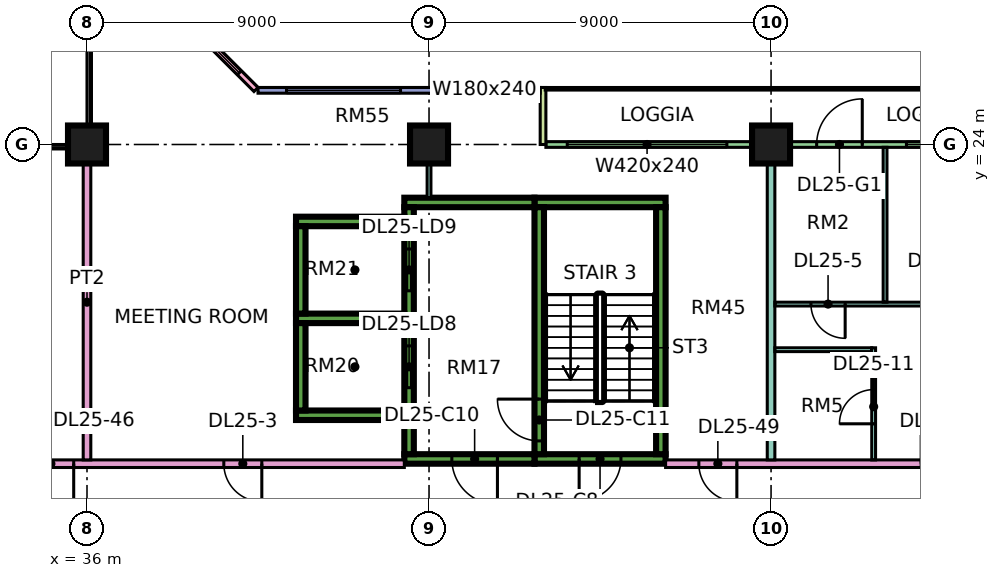
"""IFC4 building model, lengths in metres.
Left out: names, types, materials, properties, quantities, classifications, styles, units other than length and angle.
Written with IfcOpenShell. Run it as: python <this file> out.ifc"""

import sys

from ifc_helpers import new_model, si_unit, direction, frame, frame_2d, origin, origin_2d, place, context, subcontext, project, spatial, rectangle, extrude, element, fill, save


model = new_model("IFC4")
c1 = context("Model", 3, precision=1e-05, world=origin(), true_north=direction((0.0, 1.0)))
c2 = subcontext(c1, "Body", "Model", "MODEL_VIEW")
j1 = project(units=[si_unit("LENGTHUNIT", "METRE"), si_unit("PLANEANGLEUNIT", "RADIAN")], contexts=[c1])
p1 = place(None, origin())
s1 = spatial("IfcSite", under=j1, at=p1, CompositionType="ELEMENT")
p2 = place(p1, origin())
s2 = spatial("IfcBuilding", under=s1, at=p2, CompositionType="ELEMENT")
p3 = place(p2, frame((0.0, 0.0, 110.65)))
s3 = spatial("IfcBuildingStorey", under=s2, at=p3, CompositionType="ELEMENT", Elevation=110.65)
for number, where, z_axis, x_axis in (
    (1, (36.0, 24.0, 0.0), (0.0, 0.0, 1.0), (1.0, 0.0, 0.0)),
    (2, (45.0, 24.0, 0.0), (0.0, 0.0, 1.0), (1.0, 0.0, 0.0)),
    (3, (54.0, 24.0, 0.0), (0.0, 0.0, 1.0), (1.0, 0.0, 0.0)),
):
    element("IfcColumn", number, at=place(p3, frame(where, z_axis=z_axis, x_axis=x_axis)), inside=s3, PredefinedType="COLUMN", context=c2, shape_type="SweptSolid", body=[
        extrude(rectangle(XDim=1.0, YDim=1.0, at=origin_2d()), origin(), (0.0, 0.0, 1.0), 3.75),
    ])
p4 = place(p3, frame((47.775, 15.725, 0.0), z_axis=(0.0, 0.0, 1.0), x_axis=(1.0, 0.0, 0.0)))
e4 = element("IfcWall", 4, at=p4, inside=s3, PredefinedType="SHEAR", context=c2, shape_type="SweptSolid", body=[
    extrude(rectangle(XDim=3.45, YDim=0.25, at=frame_2d((1.725, 0.0))), origin(), (0.0, 0.0, 1.0), 3.75),
])
p5 = place(p4, frame((1.175, 0.0, 0.0)))
e5 = element("IfcOpeningElement", 5, at=p5, cuts=e4, PredefinedType="OPENING", context=c2, shape_type="SweptSolid", body=[
    extrude(rectangle(XDim=1.1, YDim=2.2, at=frame_2d((0.55, 1.1))), frame((0.0, 0.135, 0.0), z_axis=(0.0, -1.0, 0.0), x_axis=(1.0, 0.0, 0.0)), (0.0, 0.0, 1.0), 0.27),
])
p6 = place(p3, frame((47.775, 22.475, 0.0), z_axis=(0.0, 0.0, 1.0), x_axis=(1.0, 0.0, 0.0)))
e6 = element("IfcWall", 6, at=p6, inside=s3, PredefinedType="SHEAR", context=c2, shape_type="SweptSolid", body=[
    extrude(rectangle(XDim=3.45, YDim=0.25, at=frame_2d((1.725, 0.0))), origin(), (0.0, 0.0, 1.0), 3.75),
])
p7 = place(p3, frame((47.9, 15.85, 0.0), z_axis=(0.0, 0.0, 1.0), x_axis=(0.0, 1.0, 0.0)))
e7 = element("IfcWall", 7, at=p7, inside=s3, PredefinedType="SHEAR", context=c2, shape_type="SweptSolid", body=[
    extrude(rectangle(XDim=6.5, YDim=0.25, at=frame_2d((3.25, 0.0))), origin(), (0.0, 0.0, 1.0), 3.75),
])
p8 = place(p7, frame((0.35, 0.0, 0.0)))
e8 = element("IfcOpeningElement", 8, at=p8, cuts=e7, PredefinedType="OPENING", context=c2, shape_type="SweptSolid", body=[
    extrude(rectangle(XDim=1.1, YDim=2.2, at=frame_2d((0.55, 1.1))), frame((0.0, 0.135, 0.0), z_axis=(0.0, -1.0, 0.0), x_axis=(1.0, 0.0, 0.0)), (0.0, 0.0, 1.0), 0.27),
])
p9 = place(p3, frame((51.1, 15.85, 0.0), z_axis=(0.0, 0.0, 1.0), x_axis=(0.0, 1.0, 0.0)))
e9 = element("IfcWall", 9, at=p9, inside=s3, PredefinedType="SHEAR", context=c2, shape_type="SweptSolid", body=[
    extrude(rectangle(XDim=6.5, YDim=0.25, at=frame_2d((3.25, 0.0))), origin(), (0.0, 0.0, 1.0), 3.75),
])
p10 = place(p3, frame((44.35, 15.725, 0.0), z_axis=(0.0, 0.0, 1.0), x_axis=(1.0, 0.0, 0.0)))
e10 = element("IfcWall", 10, at=p10, inside=s3, PredefinedType="SHEAR", context=c2, shape_type="SweptSolid", body=[
    extrude(rectangle(XDim=3.425, YDim=0.25, at=frame_2d((1.712, 0.0))), origin(), (0.0, 0.0, 1.0), 3.75),
])
p11 = place(p10, frame((1.25, 0.0, 0.0)))
e11 = element("IfcOpeningElement", 11, at=p11, cuts=e10, PredefinedType="OPENING", context=c2, shape_type="SweptSolid", body=[
    extrude(rectangle(XDim=1.2, YDim=2.2, at=frame_2d((0.6, 1.1))), frame((0.0, 0.135, 0.0), z_axis=(0.0, -1.0, 0.0), x_axis=(1.0, 0.0, 0.0)), (0.0, 0.0, 1.0), 0.27),
])
p12 = place(p3, frame((44.35, 22.475, 0.0), z_axis=(0.0, 0.0, 1.0), x_axis=(1.0, 0.0, 0.0)))
e12 = element("IfcWall", 12, at=p12, inside=s3, PredefinedType="SHEAR", context=c2, shape_type="SweptSolid", body=[
    extrude(rectangle(XDim=3.425, YDim=0.25, at=frame_2d((1.712, 0.0))), origin(), (0.0, 0.0, 1.0), 3.75),
])
p13 = place(p3, frame((44.475, 15.85, 0.0), z_axis=(0.0, 0.0, 1.0), x_axis=(0.0, 1.0, 0.0)))
e13 = element("IfcWall", 13, at=p13, inside=s3, PredefinedType="SHEAR", context=c2, shape_type="SweptSolid", body=[
    extrude(rectangle(XDim=6.5, YDim=0.25, at=frame_2d((3.25, 0.0))), origin(), (0.0, 0.0, 1.0), 3.75),
])
p14 = place(p13, frame((1.75, 0.0, 0.0)))
e14 = element("IfcOpeningElement", 14, at=p14, cuts=e13, PredefinedType="OPENING", context=c2, shape_type="SweptSolid", body=[
    extrude(rectangle(XDim=1.1, YDim=2.2, at=frame_2d((0.55, 1.1))), frame((0.0, 0.135, 0.0), z_axis=(0.0, -1.0, 0.0), x_axis=(1.0, 0.0, 0.0)), (0.0, 0.0, 1.0), 0.27),
])
p15 = place(p13, frame((4.3, 0.0, 0.0)))
e15 = element("IfcOpeningElement", 15, at=p15, cuts=e13, PredefinedType="OPENING", context=c2, shape_type="SweptSolid", body=[
    extrude(rectangle(XDim=1.1, YDim=2.2, at=frame_2d((0.55, 1.1))), frame((0.0, 0.135, 0.0), z_axis=(0.0, -1.0, 0.0), x_axis=(1.0, 0.0, 0.0)), (0.0, 0.0, 1.0), 0.27),
])
for number, where, z_axis, x_axis in (
    (16, (41.5, 16.875, 0.0), (0.0, 0.0, 1.0), (1.0, 0.0, 0.0)),
    (17, (41.5, 19.425, 0.0), (0.0, 0.0, 1.0), (1.0, 0.0, 0.0)),
    (18, (41.5, 21.975, 0.0), (0.0, 0.0, 1.0), (1.0, 0.0, 0.0)),
):
    element("IfcWall", number, at=place(p3, frame(where, z_axis=z_axis, x_axis=x_axis)), inside=s3, PredefinedType="SHEAR", context=c2, shape_type="SweptSolid", body=[
        extrude(rectangle(XDim=2.85, YDim=0.25, at=frame_2d((1.425, 0.0))), origin(), (0.0, 0.0, 1.0), 3.75),
    ])
for number, where, z_axis, x_axis in (
    (19, (41.625, 17.0, 0.0), (0.0, 0.0, 1.0), (0.0, 1.0, 0.0)),
    (20, (41.625, 19.55, 0.0), (0.0, 0.0, 1.0), (0.0, 1.0, 0.0)),
):
    element("IfcWall", number, at=place(p3, frame(where, z_axis=z_axis, x_axis=x_axis)), inside=s3, PredefinedType="SHEAR", context=c2, shape_type="SweptSolid", body=[
        extrude(rectangle(XDim=2.3, YDim=0.25, at=frame_2d((1.15, 0.0))), origin(), (0.0, 0.0, 1.0), 3.75),
    ])
p16 = place(p3, frame((59.925, 24.0, 0.0), z_axis=(0.0, 0.0, 1.0), x_axis=(-1.0, 0.0, 0.0)))
e21 = element("IfcWall", 21, at=p16, inside=s3, PredefinedType="SOLIDWALL", context=c2, shape_type="SweptSolid", body=[
    extrude(rectangle(XDim=11.85, YDim=0.15, at=frame_2d((5.925, 0.0))), origin(), (0.0, 0.0, 1.0), 3.35),
])
p17 = place(p16, frame((0.562, 0.0, 0.45)))
e22 = element("IfcOpeningElement", 22, at=p17, cuts=e21, PredefinedType="OPENING", context=c2, shape_type="SweptSolid", body=[
    extrude(rectangle(XDim=1.8, YDim=2.4, at=frame_2d((0.9, 1.2))), frame((0.0, 0.085, 0.0), z_axis=(0.0, -1.0, 0.0), x_axis=(1.0, 0.0, 0.0)), (0.0, 0.0, 1.0), 0.17),
])
p18 = place(p16, frame((3.525, 0.0, 0.0)))
e23 = element("IfcOpeningElement", 23, at=p18, cuts=e21, PredefinedType="OPENING", context=c2, shape_type="SweptSolid", body=[
    extrude(rectangle(XDim=1.2, YDim=2.4, at=frame_2d((0.6, 1.2))), frame((0.0, 0.085, 0.0), z_axis=(0.0, -1.0, 0.0), x_axis=(1.0, 0.0, 0.0)), (0.0, 0.0, 1.0), 0.17),
])
p19 = place(p16, frame((7.087, 0.0, 0.45)))
e24 = element("IfcOpeningElement", 24, at=p19, cuts=e21, PredefinedType="OPENING", context=c2, shape_type="SweptSolid", body=[
    extrude(rectangle(XDim=4.2, YDim=2.4, at=frame_2d((2.1, 1.2))), frame((0.0, 0.085, 0.0), z_axis=(0.0, -1.0, 0.0), x_axis=(1.0, 0.0, 0.0)), (0.0, 0.0, 1.0), 0.17),
])
p20 = place(p3, frame((48.0, 25.5, 0.0), z_axis=(0.0, 0.0, 1.0), x_axis=(0.0, -1.0, 0.0)))
e25 = element("IfcWall", 25, at=p20, inside=s3, PredefinedType="SOLIDWALL", context=c2, shape_type="SweptSolid", body=[
    extrude(rectangle(XDim=1.5, YDim=0.15, at=frame_2d((0.75, 0.0))), origin(), (0.0, 0.0, 1.0), 3.35),
])
p21 = place(p3, frame((47.925, 25.425, 0.0), z_axis=(0.0, 0.0, 1.0), x_axis=(-1.0, 0.0, 0.0)))
e26 = element("IfcWall", 26, at=p21, inside=s3, PredefinedType="SOLIDWALL", context=c2, shape_type="SweptSolid", body=[
    extrude(rectangle(XDim=7.425, YDim=0.15, at=frame_2d((3.712, 0.0))), origin(), (0.0, 0.0, 1.0), 3.35),
])
p22 = place(p21, frame((0.562, 0.0, 0.45)))
e27 = element("IfcOpeningElement", 27, at=p22, cuts=e26, PredefinedType="OPENING", context=c2, shape_type="SweptSolid", body=[
    extrude(rectangle(XDim=1.8, YDim=2.4, at=frame_2d((0.9, 1.2))), frame((0.0, 0.085, 0.0), z_axis=(0.0, -1.0, 0.0), x_axis=(1.0, 0.0, 0.0)), (0.0, 0.0, 1.0), 0.17),
])
p23 = place(p21, frame((3.675, 0.0, 0.45)))
e28 = element("IfcOpeningElement", 28, at=p23, cuts=e26, PredefinedType="OPENING", context=c2, shape_type="SweptSolid", body=[
    extrude(rectangle(XDim=3.0, YDim=2.4, at=frame_2d((1.5, 1.2))), frame((0.0, 0.085, 0.0), z_axis=(0.0, -1.0, 0.0), x_axis=(1.0, 0.0, 0.0)), (0.0, 0.0, 1.0), 0.17),
])
p24 = place(p3, frame((40.447, 25.447, 0.0), z_axis=(0.0, 0.0, 1.0), x_axis=(-0.707106781187, 0.707106781187, 0.0)))
e29 = element("IfcWall", 29, at=p24, inside=s3, PredefinedType="SOLIDWALL", context=c2, shape_type="SweptSolid", body=[
    extrude(rectangle(XDim=4.243, YDim=0.15, at=frame_2d((2.121, 0.0))), origin(), (0.0, 0.0, 1.0), 3.35),
])
p25 = place(p24, frame((0.621, 0.0, 0.45)))
e30 = element("IfcOpeningElement", 30, at=p25, cuts=e29, PredefinedType="OPENING", context=c2, shape_type="SweptSolid", body=[
    extrude(rectangle(XDim=3.0, YDim=2.4, at=frame_2d((1.5, 1.2))), frame((0.0, 0.085, 0.0), z_axis=(0.0, -1.0, 0.0), x_axis=(1.0, 0.0, 0.0)), (0.0, 0.0, 1.0), 0.17),
])
p26 = place(p3, frame((34.0, 15.6, 0.0), z_axis=(0.0, 0.0, 1.0), x_axis=(1.0, 0.0, 0.0)))
e31 = element("IfcWall", 31, at=p26, inside=s3, PredefinedType="PARTITIONING", context=c2, shape_type="SweptSolid", body=[
    extrude(rectangle(XDim=10.35, YDim=0.2, at=frame_2d((5.175, 0.0))), origin(), (0.0, 0.0, 1.0), 3.35),
])
p27 = place(p26, frame((5.6, 0.0, 0.0)))
e32 = element("IfcOpeningElement", 32, at=p27, cuts=e31, PredefinedType="OPENING", context=c2, shape_type="SweptSolid", body=[
    extrude(rectangle(XDim=1.0, YDim=2.1, at=frame_2d((0.5, 1.05))), frame((0.0, 0.11, 0.0), z_axis=(0.0, -1.0, 0.0), x_axis=(1.0, 0.0, 0.0)), (0.0, 0.0, 1.0), 0.22),
])
p28 = place(p26, frame((0.45, 0.0, 0.0)))
e33 = element("IfcOpeningElement", 33, at=p28, cuts=e31, PredefinedType="OPENING", context=c2, shape_type="SweptSolid", body=[
    extrude(rectangle(XDim=1.2, YDim=2.1, at=frame_2d((0.6, 1.05))), frame((0.0, 0.11, 0.0), z_axis=(0.0, -1.0, 0.0), x_axis=(1.0, 0.0, 0.0)), (0.0, 0.0, 1.0), 0.22),
])
p29 = place(p3, frame((36.0, 15.7, 0.0), z_axis=(0.0, 0.0, 1.0), x_axis=(0.0, 1.0, 0.0)))
e34 = element("IfcWall", 34, at=p29, inside=s3, PredefinedType="PARTITIONING", context=c2, shape_type="SweptSolid", body=[
    extrude(rectangle(XDim=8.3, YDim=0.2, at=frame_2d((4.15, 0.0))), origin(), (0.0, 0.0, 1.0), 3.35),
])
p30 = place(p3, frame((45.0, 22.6, 0.0), z_axis=(0.0, 0.0, 1.0), x_axis=(0.0, 1.0, 0.0)))
e35 = element("IfcWall", 35, at=p30, inside=s3, PredefinedType="PARTITIONING", context=c2, shape_type="SweptSolid", body=[
    extrude(rectangle(XDim=1.4, YDim=0.1, at=frame_2d((0.7, 0.0))), origin(), (0.0, 0.0, 1.0), 3.35),
])
p31 = place(p3, frame((51.225, 15.6, 0.0), z_axis=(0.0, 0.0, 1.0), x_axis=(1.0, 0.0, 0.0)))
e36 = element("IfcWall", 36, at=p31, inside=s3, PredefinedType="PARTITIONING", context=c2, shape_type="SweptSolid", body=[
    extrude(rectangle(XDim=22.125, YDim=0.2, at=frame_2d((11.062, 0.0))), origin(), (0.0, 0.0, 1.0), 3.35),
])
p32 = place(p31, frame((6.725, 0.0, 0.0)))
e37 = element("IfcOpeningElement", 37, at=p32, cuts=e36, PredefinedType="OPENING", context=c2, shape_type="SweptSolid", body=[
    extrude(rectangle(XDim=1.0, YDim=2.1, at=frame_2d((0.5, 1.05))), frame((0.0, 0.11, 0.0), z_axis=(0.0, -1.0, 0.0), x_axis=(1.0, 0.0, 0.0)), (0.0, 0.0, 1.0), 0.22),
])
p33 = place(p31, frame((0.875, 0.0, 0.0)))
e38 = element("IfcOpeningElement", 38, at=p33, cuts=e36, PredefinedType="OPENING", context=c2, shape_type="SweptSolid", body=[
    extrude(rectangle(XDim=1.0, YDim=2.1, at=frame_2d((0.5, 1.05))), frame((0.0, 0.11, 0.0), z_axis=(0.0, -1.0, 0.0), x_axis=(1.0, 0.0, 0.0)), (0.0, 0.0, 1.0), 0.22),
])
p34 = place(p3, frame((54.0, 15.7, 0.0), z_axis=(0.0, 0.0, 1.0), x_axis=(0.0, 1.0, 0.0)))
e39 = element("IfcWall", 39, at=p34, inside=s3, PredefinedType="PARTITIONING", context=c2, shape_type="SweptSolid", body=[
    extrude(rectangle(XDim=8.226, YDim=0.2, at=frame_2d((4.113, 0.0))), origin(), (0.0, 0.0, 1.0), 3.35),
])
p35 = place(p3, frame((54.1, 18.6, 0.0), z_axis=(0.0, 0.0, 1.0), x_axis=(1.0, 0.0, 0.0)))
e40 = element("IfcWall", 40, at=p35, inside=s3, PredefinedType="PARTITIONING", context=c2, shape_type="SweptSolid", body=[
    extrude(rectangle(XDim=2.55, YDim=0.1, at=frame_2d((1.275, 0.0))), origin(), (0.0, 0.0, 1.0), 3.35),
])
p36 = place(p3, frame((54.1, 19.8, 0.0), z_axis=(0.0, 0.0, 1.0), x_axis=(1.0, 0.0, 0.0)))
e41 = element("IfcWall", 41, at=p36, inside=s3, PredefinedType="PARTITIONING", context=c2, shape_type="SweptSolid", body=[
    extrude(rectangle(XDim=8.95, YDim=0.1, at=frame_2d((4.475, 0.0))), origin(), (0.0, 0.0, 1.0), 3.35),
])
p37 = place(p36, frame((0.95, 0.0, 0.0)))
e42 = element("IfcOpeningElement", 42, at=p37, cuts=e41, PredefinedType="OPENING", context=c2, shape_type="SweptSolid", body=[
    extrude(rectangle(XDim=0.9, YDim=2.1, at=frame_2d((0.45, 1.05))), frame((0.0, 0.06, 0.0), z_axis=(0.0, -1.0, 0.0), x_axis=(1.0, 0.0, 0.0)), (0.0, 0.0, 1.0), 0.12),
])
p38 = place(p36, frame((3.95, 0.0, 0.0)))
e43 = element("IfcOpeningElement", 43, at=p38, cuts=e41, PredefinedType="OPENING", context=c2, shape_type="SweptSolid", body=[
    extrude(rectangle(XDim=0.9, YDim=2.1, at=frame_2d((0.45, 1.05))), frame((0.0, 0.06, 0.0), z_axis=(0.0, -1.0, 0.0), x_axis=(1.0, 0.0, 0.0)), (0.0, 0.0, 1.0), 0.12),
])
p39 = place(p3, frame((56.7, 15.7, 0.0), z_axis=(0.0, 0.0, 1.0), x_axis=(0.0, 1.0, 0.0)))
e44 = element("IfcWall", 44, at=p39, inside=s3, PredefinedType="PARTITIONING", context=c2, shape_type="SweptSolid", body=[
    extrude(rectangle(XDim=2.95, YDim=0.1, at=frame_2d((1.475, 0.0))), origin(), (0.0, 0.0, 1.0), 3.35),
])
p40 = place(p39, frame((0.95, 0.0, 0.0)))
e45 = element("IfcOpeningElement", 45, at=p40, cuts=e44, PredefinedType="OPENING", context=c2, shape_type="SweptSolid", body=[
    extrude(rectangle(XDim=0.9, YDim=2.1, at=frame_2d((0.45, 1.05))), frame((0.0, 0.06, 0.0), z_axis=(0.0, -1.0, 0.0), x_axis=(1.0, 0.0, 0.0)), (0.0, 0.0, 1.0), 0.12),
])
p41 = place(p3, frame((57.0, 19.85, 0.0), z_axis=(0.0, 0.0, 1.0), x_axis=(0.0, 1.0, 0.0)))
e46 = element("IfcWall", 46, at=p41, inside=s3, PredefinedType="PARTITIONING", context=c2, shape_type="SweptSolid", body=[
    extrude(rectangle(XDim=4.076, YDim=0.1, at=frame_2d((2.038, 0.0))), origin(), (0.0, 0.0, 1.0), 3.35),
])
p42 = place(p17, origin())
e47 = element("IfcWindow", 47, at=p42, inside=s3, PartitioningType="SINGLE_PANEL", PredefinedType="WINDOW", context=c2, shape_type="SweptSolid", body=[
    extrude(rectangle(XDim=1.8, YDim=2.4, at=frame_2d((0.9, 1.2))), frame((0.0, 0.03, 0.0), z_axis=(0.0, -1.0, 0.0), x_axis=(1.0, 0.0, 0.0)), (0.0, 0.0, 1.0), 0.06),
])
fill(e22, e47)
p43 = place(p18, frame((1.2, 0.0, 0.0), z_axis=(0.0, 0.0, 1.0), x_axis=(-1.0, 0.0, 0.0)))
e48 = element("IfcDoor", 48, at=p43, inside=s3, OperationType="DOUBLE_DOOR_SINGLE_SWING", PredefinedType="DOOR", context=c2, shape_type="SweptSolid", body=[
    extrude(rectangle(XDim=1.2, YDim=2.4, at=frame_2d((0.6, 1.2))), frame((0.0, 0.025, 0.0), z_axis=(0.0, -1.0, 0.0), x_axis=(1.0, 0.0, 0.0)), (0.0, 0.0, 1.0), 0.05),
])
fill(e23, e48)
p44 = place(p19, origin())
e49 = element("IfcWindow", 49, at=p44, inside=s3, PartitioningType="SINGLE_PANEL", PredefinedType="WINDOW", context=c2, shape_type="SweptSolid", body=[
    extrude(rectangle(XDim=4.2, YDim=2.4, at=frame_2d((2.1, 1.2))), frame((0.0, 0.03, 0.0), z_axis=(0.0, -1.0, 0.0), x_axis=(1.0, 0.0, 0.0)), (0.0, 0.0, 1.0), 0.06),
])
fill(e24, e49)
p45 = place(p22, origin())
e50 = element("IfcWindow", 50, at=p45, inside=s3, PartitioningType="SINGLE_PANEL", PredefinedType="WINDOW", context=c2, shape_type="SweptSolid", body=[
    extrude(rectangle(XDim=1.8, YDim=2.4, at=frame_2d((0.9, 1.2))), frame((0.0, 0.03, 0.0), z_axis=(0.0, -1.0, 0.0), x_axis=(1.0, 0.0, 0.0)), (0.0, 0.0, 1.0), 0.06),
])
fill(e27, e50)
p46 = place(p23, origin())
e51 = element("IfcWindow", 51, at=p46, inside=s3, PartitioningType="SINGLE_PANEL", PredefinedType="WINDOW", context=c2, shape_type="SweptSolid", body=[
    extrude(rectangle(XDim=3.0, YDim=2.4, at=frame_2d((1.5, 1.2))), frame((0.0, 0.03, 0.0), z_axis=(0.0, -1.0, 0.0), x_axis=(1.0, 0.0, 0.0)), (0.0, 0.0, 1.0), 0.06),
])
fill(e28, e51)
p47 = place(p25, origin())
e52 = element("IfcWindow", 52, at=p47, inside=s3, PartitioningType="SINGLE_PANEL", PredefinedType="WINDOW", context=c2, shape_type="SweptSolid", body=[
    extrude(rectangle(XDim=3.0, YDim=2.4, at=frame_2d((1.5, 1.2))), frame((0.0, 0.03, 0.0), z_axis=(0.0, -1.0, 0.0), x_axis=(1.0, 0.0, 0.0)), (0.0, 0.0, 1.0), 0.06),
])
fill(e30, e52)
p48 = place(p5, frame((1.1, 0.0, 0.0), z_axis=(0.0, 0.0, 1.0), x_axis=(-1.0, 0.0, 0.0)))
e53 = element("IfcDoor", 53, at=p48, inside=s3, OperationType="SINGLE_SWING_LEFT", PredefinedType="DOOR", context=c2, shape_type="SweptSolid", body=[
    extrude(rectangle(XDim=1.1, YDim=2.2, at=frame_2d((0.55, 1.1))), frame((0.0, 0.025, 0.0), z_axis=(0.0, -1.0, 0.0), x_axis=(1.0, 0.0, 0.0)), (0.0, 0.0, 1.0), 0.05),
])
fill(e5, e53)
p49 = place(p11, origin())
e54 = element("IfcDoor", 54, at=p49, inside=s3, OperationType="SINGLE_SWING_RIGHT", PredefinedType="DOOR", context=c2, shape_type="SweptSolid", body=[
    extrude(rectangle(XDim=1.2, YDim=2.2, at=frame_2d((0.6, 1.1))), frame((0.0, 0.025, 0.0), z_axis=(0.0, -1.0, 0.0), x_axis=(1.0, 0.0, 0.0)), (0.0, 0.0, 1.0), 0.05),
])
fill(e11, e54)
p50 = place(p8, frame((1.1, 0.0, 0.0), z_axis=(0.0, 0.0, 1.0), x_axis=(-1.0, 0.0, 0.0)))
e55 = element("IfcDoor", 55, at=p50, inside=s3, OperationType="SINGLE_SWING_RIGHT", PredefinedType="DOOR", context=c2, shape_type="SweptSolid", body=[
    extrude(rectangle(XDim=1.1, YDim=2.2, at=frame_2d((0.55, 1.1))), frame((0.0, 0.025, 0.0), z_axis=(0.0, -1.0, 0.0), x_axis=(1.0, 0.0, 0.0)), (0.0, 0.0, 1.0), 0.05),
])
fill(e8, e55)
p51 = place(p14, origin())
e56 = element("IfcDoor", 56, at=p51, inside=s3, OperationType="DOUBLE_DOOR_SLIDING", PredefinedType="DOOR", context=c2, shape_type="SweptSolid", body=[
    extrude(rectangle(XDim=1.1, YDim=2.2, at=frame_2d((0.55, 1.1))), frame((0.0, 0.025, 0.0), z_axis=(0.0, -1.0, 0.0), x_axis=(1.0, 0.0, 0.0)), (0.0, 0.0, 1.0), 0.05),
])
fill(e14, e56)
p52 = place(p15, origin())
e57 = element("IfcDoor", 57, at=p52, inside=s3, OperationType="DOUBLE_DOOR_SLIDING", PredefinedType="DOOR", context=c2, shape_type="SweptSolid", body=[
    extrude(rectangle(XDim=1.1, YDim=2.2, at=frame_2d((0.55, 1.1))), frame((0.0, 0.025, 0.0), z_axis=(0.0, -1.0, 0.0), x_axis=(1.0, 0.0, 0.0)), (0.0, 0.0, 1.0), 0.05),
])
fill(e15, e57)
p53 = place(p27, origin())
e58 = element("IfcDoor", 58, at=p53, inside=s3, OperationType="SINGLE_SWING_RIGHT", PredefinedType="DOOR", context=c2, shape_type="SweptSolid", body=[
    extrude(rectangle(XDim=1.0, YDim=2.1, at=frame_2d((0.5, 1.05))), frame((0.0, 0.025, 0.0), z_axis=(0.0, -1.0, 0.0), x_axis=(1.0, 0.0, 0.0)), (0.0, 0.0, 1.0), 0.05),
])
fill(e32, e58)
p54 = place(p37, origin())
e59 = element("IfcDoor", 59, at=p54, inside=s3, OperationType="SINGLE_SWING_RIGHT", PredefinedType="DOOR", context=c2, shape_type="SweptSolid", body=[
    extrude(rectangle(XDim=0.9, YDim=2.1, at=frame_2d((0.45, 1.05))), frame((0.0, 0.025, 0.0), z_axis=(0.0, -1.0, 0.0), x_axis=(1.0, 0.0, 0.0)), (0.0, 0.0, 1.0), 0.05),
])
fill(e42, e59)
p55 = place(p40, origin())
e60 = element("IfcDoor", 60, at=p55, inside=s3, OperationType="SINGLE_SWING_LEFT", PredefinedType="DOOR", context=c2, shape_type="SweptSolid", body=[
    extrude(rectangle(XDim=0.9, YDim=2.1, at=frame_2d((0.45, 1.05))), frame((0.0, 0.025, 0.0), z_axis=(0.0, -1.0, 0.0), x_axis=(1.0, 0.0, 0.0)), (0.0, 0.0, 1.0), 0.05),
])
fill(e45, e60)
p56 = place(p28, origin())
e61 = element("IfcDoor", 61, at=p56, inside=s3, OperationType="SINGLE_SWING_RIGHT", PredefinedType="DOOR", context=c2, shape_type="SweptSolid", body=[
    extrude(rectangle(XDim=1.2, YDim=2.1, at=frame_2d((0.6, 1.05))), frame((0.0, 0.025, 0.0), z_axis=(0.0, -1.0, 0.0), x_axis=(1.0, 0.0, 0.0)), (0.0, 0.0, 1.0), 0.05),
])
fill(e33, e61)
p57 = place(p33, origin())
e62 = element("IfcDoor", 62, at=p57, inside=s3, OperationType="SINGLE_SWING_RIGHT", PredefinedType="DOOR", context=c2, shape_type="SweptSolid", body=[
    extrude(rectangle(XDim=1.0, YDim=2.1, at=frame_2d((0.5, 1.05))), frame((0.0, 0.025, 0.0), z_axis=(0.0, -1.0, 0.0), x_axis=(1.0, 0.0, 0.0)), (0.0, 0.0, 1.0), 0.05),
])
fill(e38, e62)
save(model, sys.argv[1])
